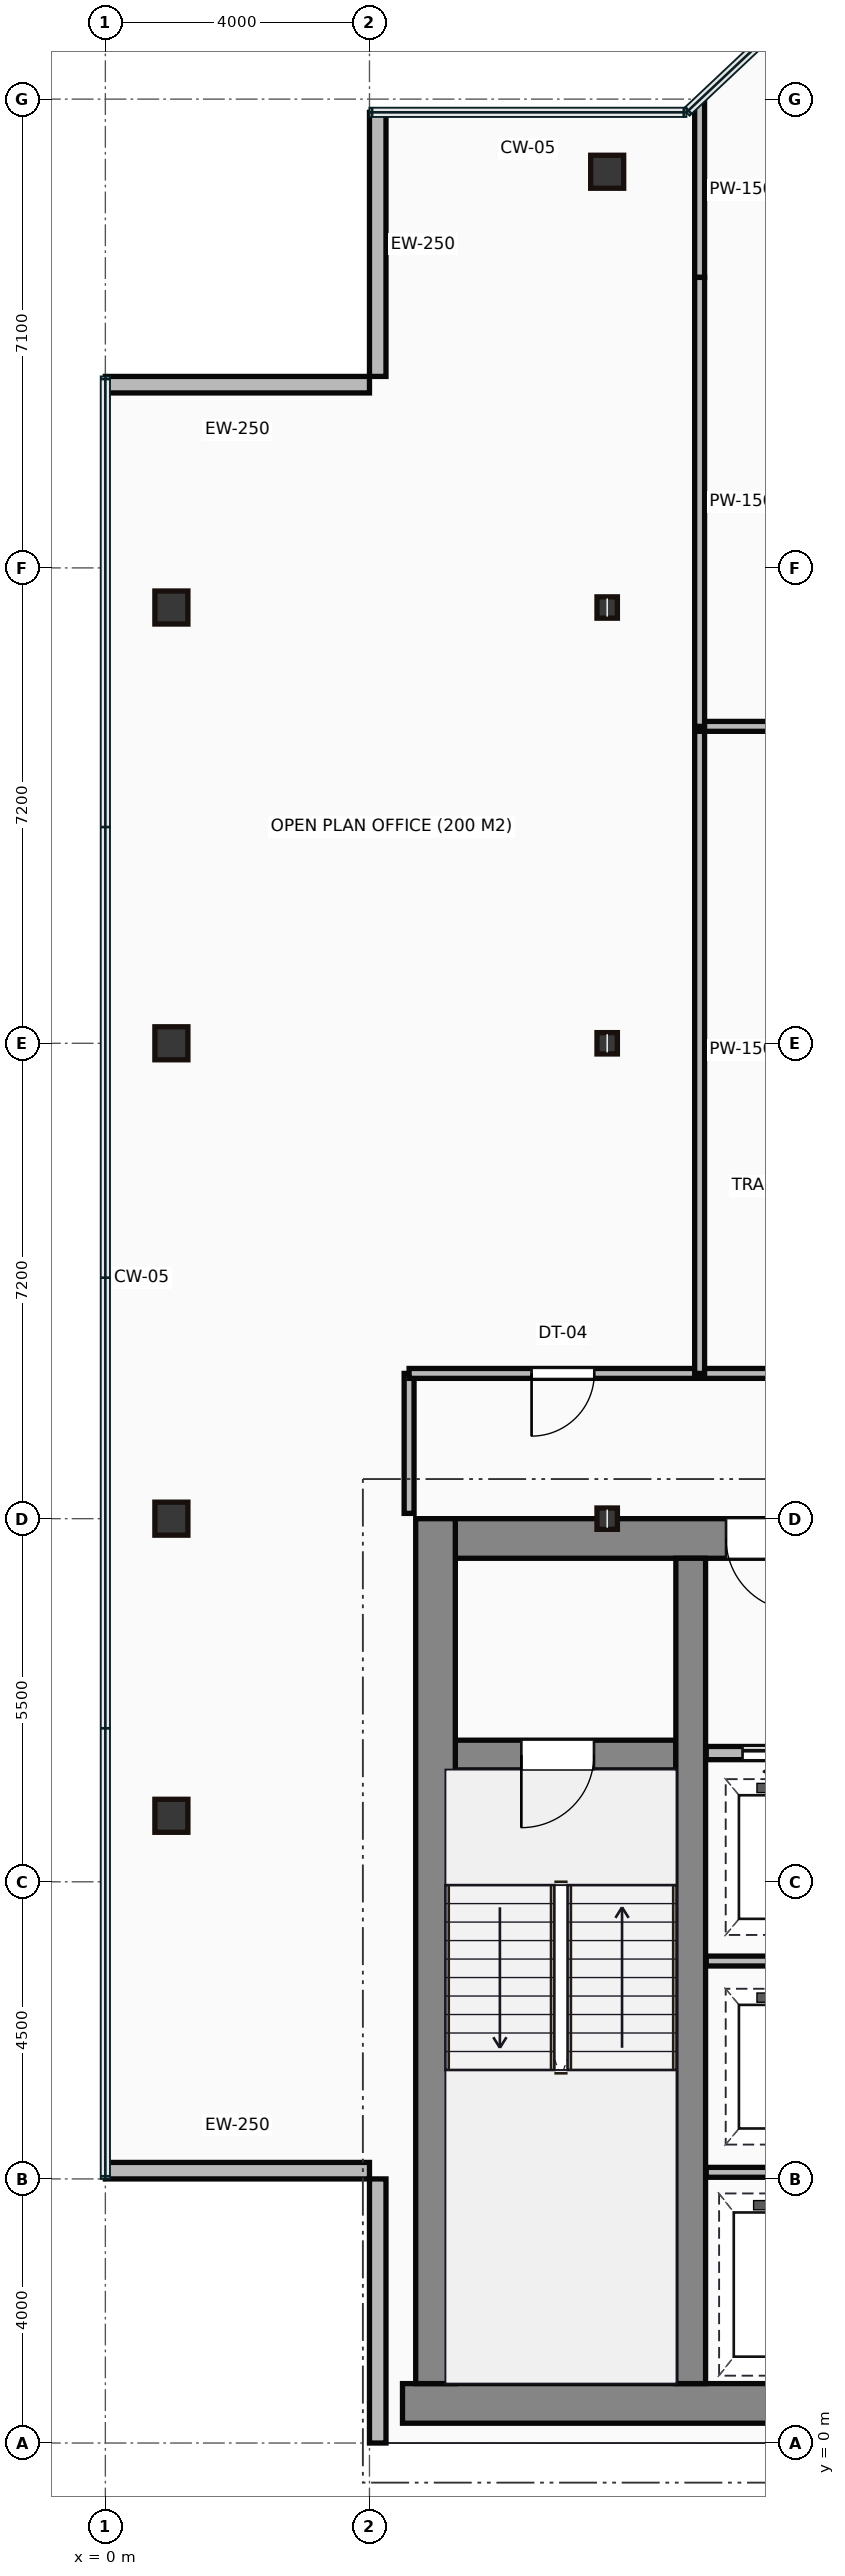
"""IFC4 building model, lengths in metres.
Left out: names, types, materials, properties, quantities, classifications, styles, units other than length and angle.
Written with IfcOpenShell. Run it as: python <this file> out.ifc"""

import sys

from ifc_helpers import new_model, si_unit, direction, frame, frame_2d, origin, origin_2d, place, context, subcontext, project, spatial, rectangle, hollow_rectangle, i_section, extrude, source, transform, mapped, element, fill, save


model = new_model("IFC4")
c1 = context("Model", 3, precision=1e-05, world=origin(), true_north=direction((0.0, 1.0)))
c2 = subcontext(c1, "Body", "Model", "MODEL_VIEW")
j1 = project(units=[si_unit("LENGTHUNIT", "METRE"), si_unit("PLANEANGLEUNIT", "RADIAN")], contexts=[c1])
p1 = place(None, origin())
s1 = spatial("IfcSite", under=j1, at=p1, CompositionType="ELEMENT")
p2 = place(p1, origin())
s2 = spatial("IfcBuilding", under=s1, at=p2, CompositionType="ELEMENT")
p3 = place(p2, frame((0.0, 0.0, 280.7)))
s3 = spatial("IfcBuildingStorey", under=s2, at=p3, CompositionType="ELEMENT", Elevation=280.7)
m1 = source(origin(), c2, "Body", "SweptSolid", [
    extrude(rectangle(XDim=29.5, YDim=0.6, at=frame_2d((14.75, 0.0))), origin(), (0.0, 0.0, 1.0), 3.65),
])
p4 = place(p3, frame((4.5, 0.6, 0.0), z_axis=(0.0, 0.0, 1.0), x_axis=(1.0, 0.0, 0.0)))
e1 = element("IfcWall", 1, at=p4, inside=s3, PredefinedType="SHEAR", context=c2, shape_type="MappedRepresentation", body=[
    mapped(m1, transform((0.0, 0.0, 0.0))),
])
m2 = source(origin(), c2, "Body", "SweptSolid", [
    extrude(rectangle(XDim=13.1, YDim=0.6, at=frame_2d((6.55, 0.0))), origin(), (0.0, 0.0, 1.0), 3.65),
])
p5 = place(p3, frame((5.0, 0.9, 0.0), z_axis=(0.0, 0.0, 1.0), x_axis=(0.0, 1.0, 0.0)))
e2 = element("IfcWall", 2, at=p5, inside=s3, PredefinedType="SHEAR", context=c2, shape_type="MappedRepresentation", body=[
    mapped(m2, transform((0.0, 0.0, 0.0))),
])
m3 = source(origin(), c2, "Body", "SweptSolid", [
    extrude(rectangle(XDim=9.1, YDim=0.6, at=frame_2d((4.55, 0.0))), origin(), (0.0, 0.0, 1.0), 3.65),
])
p6 = place(p3, frame((5.3, 13.7, 0.0), z_axis=(0.0, 0.0, 1.0), x_axis=(1.0, 0.0, 0.0)))
e3 = element("IfcWall", 3, at=p6, inside=s3, PredefinedType="SHEAR", context=c2, shape_type="MappedRepresentation", body=[
    mapped(m3, transform((0.0, 0.0, 0.0))),
])
p7 = place(p6, frame((4.1, 0.0, 0.0)))
e4 = element("IfcOpeningElement", 4, at=p7, cuts=e3, PredefinedType="OPENING", context=c2, shape_type="SweptSolid", body=[
    extrude(rectangle(XDim=1.1, YDim=2.15, at=frame_2d((0.55, 1.075))), frame((0.0, 0.31, 0.0), z_axis=(0.0, -1.0, 0.0), x_axis=(1.0, 0.0, 0.0)), (0.0, 0.0, 1.0), 0.62),
])
m4 = source(origin(), c2, "Body", "SweptSolid", [
    extrude(rectangle(XDim=12.5, YDim=0.45, at=frame_2d((6.25, 0.0))), origin(), (0.0, 0.0, 1.0), 3.65),
])
p8 = place(p3, frame((8.865, 0.9, 0.0), z_axis=(0.0, 0.0, 1.0), x_axis=(0.0, 1.0, 0.0)))
e5 = element("IfcWall", 5, at=p8, inside=s3, PredefinedType="SHEAR", context=c2, shape_type="MappedRepresentation", body=[
    mapped(m4, transform((0.0, 0.0, 0.0))),
])
m5 = source(origin(), c2, "Body", "SweptSolid", [
    extrude(rectangle(XDim=3.39, YDim=0.45, at=frame_2d((1.695, 0.0))), origin(), (0.0, 0.0, 1.0), 3.65),
])
p9 = place(p3, frame((5.25, 10.42, 0.0), z_axis=(0.0, 0.0, 1.0), x_axis=(1.0, 0.0, 0.0)))
e6 = element("IfcWall", 6, at=p9, inside=s3, PredefinedType="SHEAR", context=c2, shape_type="MappedRepresentation", body=[
    mapped(m5, transform((0.0, 0.0, 0.0))),
])
p10 = place(p9, frame((1.05, 0.0, 0.0)))
e7 = element("IfcOpeningElement", 7, at=p10, cuts=e6, PredefinedType="OPENING", context=c2, shape_type="SweptSolid", body=[
    extrude(rectangle(XDim=1.1, YDim=2.15, at=frame_2d((0.55, 1.075))), frame((0.0, 0.235, 0.0), z_axis=(0.0, -1.0, 0.0), x_axis=(1.0, 0.0, 0.0)), (0.0, 0.0, 1.0), 0.47),
])
m6 = source(origin(), c2, "Body", "SweptSolid", [
    extrude(hollow_rectangle(XDim=0.5, YDim=0.5, WallThickness=0.022, at=origin_2d()), origin(), (0.0, 0.0, 1.0), 3.65),
])
for number, where, z_axis, x_axis in (
    (8, (1.0, 9.5, 0.0), (0.0, 0.0, 1.0), (1.0, 0.0, 0.0)),
    (9, (1.0, 14.0, 0.0), (0.0, 0.0, 1.0), (1.0, 0.0, 0.0)),
    (10, (1.0, 21.2, 0.0), (0.0, 0.0, 1.0), (1.0, 0.0, 0.0)),
    (11, (1.0, 27.8, 0.0), (0.0, 0.0, 1.0), (1.0, 0.0, 0.0)),
):
    element("IfcColumn", number, at=place(p3, frame(where, z_axis=z_axis, x_axis=x_axis)), inside=s3, PredefinedType="COLUMN", context=c2, shape_type="MappedRepresentation", body=[
        mapped(m6, transform((0.0, 0.0, 0.0))),
    ])
m7 = source(origin(), c2, "Body", "SweptSolid", [
    extrude(i_section(OverallWidth=0.309, OverallDepth=0.323, WebThickness=0.014, FlangeThickness=0.023, at=origin_2d()), origin(), (0.0, 0.0, 1.0), 3.65),
])
for number, where, z_axis, x_axis in (
    (12, (7.6, 14.0, 0.0), (0.0, 0.0, 1.0), (1.0, 0.0, 0.0)),
    (13, (7.6, 21.2, 0.0), (0.0, 0.0, 1.0), (1.0, 0.0, 0.0)),
    (14, (7.6, 27.8, 0.0), (0.0, 0.0, 1.0), (1.0, 0.0, 0.0)),
):
    element("IfcColumn", number, at=place(p3, frame(where, z_axis=z_axis, x_axis=x_axis)), inside=s3, PredefinedType="COLUMN", context=c2, shape_type="MappedRepresentation", body=[
        mapped(m7, transform((0.0, 0.0, 0.0))),
    ])
p11 = place(p3, frame((7.6, 34.4, 0.0), z_axis=(0.0, 0.0, 1.0), x_axis=(1.0, 0.0, 0.0)))
e15 = element("IfcColumn", 15, at=p11, inside=s3, PredefinedType="COLUMN", context=c2, shape_type="MappedRepresentation", body=[
    mapped(m6, transform((0.0, 0.0, 0.0))),
])
m8 = source(origin(), c2, "Body", "SweptSolid", [
    extrude(rectangle(XDim=4.0, YDim=0.25, at=frame_2d((2.0, 0.0))), origin(), (0.0, 0.0, 1.0), 3.4),
])
for number, where, z_axis, x_axis in (
    (16, (4.125, 35.3, 0.0), (0.0, 0.0, 1.0), (0.0, -1.0, 0.0)),
    (17, (4.0, 31.175, 0.0), (0.0, 0.0, 1.0), (-1.0, 0.0, 0.0)),
    (18, (0.0, 4.125, 0.0), (0.0, 0.0, 1.0), (1.0, 0.0, 0.0)),
    (19, (4.125, 4.0, 0.0), (0.0, 0.0, 1.0), (0.0, -1.0, 0.0)),
):
    element("IfcWall", number, at=place(p3, frame(where, z_axis=z_axis, x_axis=x_axis)), inside=s3, PredefinedType="STANDARD", context=c2, shape_type="MappedRepresentation", body=[
        mapped(m8, transform((0.0, 0.0, 0.0))),
    ])
m9 = source(origin(), c2, "Body", "SweptSolid", [
    extrude(rectangle(XDim=2.35, YDim=0.2, at=frame_2d((1.175, 0.0))), origin(), (0.0, 0.0, 1.0), 3.4),
])
p12 = place(p3, frame((9.1, 10.45, 0.0), z_axis=(0.0, 0.0, 1.0), x_axis=(1.0, 0.0, 0.0)))
e20 = element("IfcWall", 20, at=p12, inside=s3, PredefinedType="PARTITIONING", context=c2, shape_type="MappedRepresentation", body=[
    mapped(m9, transform((0.0, 0.0, 0.0))),
])
p13 = place(p12, frame((0.55, 0.0, 0.0)))
e21 = element("IfcOpeningElement", 21, at=p13, cuts=e20, PredefinedType="OPENING", context=c2, shape_type="SweptSolid", body=[
    extrude(rectangle(XDim=1.1, YDim=2.15, at=frame_2d((0.55, 1.075))), frame((0.0, 0.11, 0.0), z_axis=(0.0, -1.0, 0.0), x_axis=(1.0, 0.0, 0.0)), (0.0, 0.0, 1.0), 0.22),
])
m10 = source(origin(), c2, "Body", "SweptSolid", [
    extrude(rectangle(XDim=2.4, YDim=0.15, at=frame_2d((1.2, 0.0))), origin(), (0.0, 0.0, 1.0), 3.4),
])
for number, where, z_axis, x_axis in (
    (22, (9.1, 4.1, 0.0), (0.0, 0.0, 1.0), (1.0, 0.0, 0.0)),
    (23, (9.1, 7.3, 0.0), (0.0, 0.0, 1.0), (1.0, 0.0, 0.0)),
):
    element("IfcWall", number, at=place(p3, frame(where, z_axis=z_axis, x_axis=x_axis)), inside=s3, PredefinedType="PARTITIONING", context=c2, shape_type="MappedRepresentation", body=[
        mapped(m10, transform((0.0, 0.0, 0.0))),
    ])
m11 = source(origin(), c2, "Body", "SweptSolid", [
    extrude(rectangle(XDim=2.12, YDim=0.15, at=frame_2d((1.06, 0.0))), origin(), (0.0, 0.0, 1.0), 3.4),
])
p14 = place(p3, frame((4.6, 14.08, 0.0), z_axis=(0.0, 0.0, 1.0), x_axis=(0.0, 1.0, 0.0)))
e24 = element("IfcWall", 24, at=p14, inside=s3, PredefinedType="PARTITIONING", context=c2, shape_type="MappedRepresentation", body=[
    mapped(m11, transform((0.0, 0.0, 0.0))),
])
m12 = source(origin(), c2, "Body", "SweptSolid", [
    extrude(rectangle(XDim=12.2, YDim=0.15, at=frame_2d((6.1, 0.0))), origin(), (0.0, 0.0, 1.0), 3.4),
])
p15 = place(p3, frame((4.6, 16.2, 0.0), z_axis=(0.0, 0.0, 1.0), x_axis=(1.0, 0.0, 0.0)))
e25 = element("IfcWall", 25, at=p15, inside=s3, PredefinedType="PARTITIONING", context=c2, shape_type="MappedRepresentation", body=[
    mapped(m12, transform((0.0, 0.0, 0.0))),
])
p16 = place(p15, frame((1.855, 0.0, 0.0)))
e26 = element("IfcOpeningElement", 26, at=p16, cuts=e25, PredefinedType="OPENING", context=c2, shape_type="SweptSolid", body=[
    extrude(rectangle(XDim=0.95, YDim=2.15, at=frame_2d((0.475, 1.075))), frame((0.0, 0.085, 0.0), z_axis=(0.0, -1.0, 0.0), x_axis=(1.0, 0.0, 0.0)), (0.0, 0.0, 1.0), 0.17),
])
m13 = source(origin(), c2, "Body", "SweptSolid", [
    extrude(rectangle(XDim=9.8, YDim=0.15, at=frame_2d((4.9, 0.0))), origin(), (0.0, 0.0, 1.0), 3.4),
])
p17 = place(p3, frame((9.0, 26.0, 0.0), z_axis=(0.0, 0.0, 1.0), x_axis=(0.0, -1.0, 0.0)))
e27 = element("IfcWall", 27, at=p17, inside=s3, PredefinedType="PARTITIONING", context=c2, shape_type="MappedRepresentation", body=[
    mapped(m13, transform((0.0, 0.0, 0.0))),
])
m14 = source(origin(), c2, "Body", "SweptSolid", [
    extrude(rectangle(XDim=7.8, YDim=0.15, at=frame_2d((3.9, 0.0))), origin(), (0.0, 0.0, 1.0), 3.4),
])
p18 = place(p3, frame((9.0, 26.0, 0.0), z_axis=(0.0, 0.0, 1.0), x_axis=(1.0, 0.0, 0.0)))
e28 = element("IfcWall", 28, at=p18, inside=s3, PredefinedType="PARTITIONING", context=c2, shape_type="MappedRepresentation", body=[
    mapped(m14, transform((0.0, 0.0, 0.0))),
])
m15 = source(origin(), c2, "Body", "SweptSolid", [
    extrude(rectangle(XDim=2.661, YDim=0.15, at=frame_2d((1.33, 0.0))), origin(), (0.0, 0.0, 1.0), 3.4),
])
p19 = place(p3, frame((9.0, 35.461, 0.0), z_axis=(0.0, 0.0, 1.0), x_axis=(0.0, -1.0, 0.0)))
e29 = element("IfcWall", 29, at=p19, inside=s3, PredefinedType="PARTITIONING", context=c2, shape_type="MappedRepresentation", body=[
    mapped(m15, transform((0.0, 0.0, 0.0))),
])
m16 = source(origin(), c2, "Body", "SweptSolid", [
    extrude(rectangle(XDim=6.8, YDim=0.15, at=frame_2d((3.4, 0.0))), origin(), (0.0, 0.0, 1.0), 3.4),
])
p20 = place(p3, frame((9.0, 32.8, 0.0), z_axis=(0.0, 0.0, 1.0), x_axis=(0.0, -1.0, 0.0)))
e30 = element("IfcWall", 30, at=p20, inside=s3, PredefinedType="PARTITIONING", context=c2, shape_type="MappedRepresentation", body=[
    mapped(m16, transform((0.0, 0.0, 0.0))),
])
m17 = source(origin(), c2, "Body", "SweptSolid", [
    extrude(rectangle(XDim=1.1, YDim=2.15, at=frame_2d((0.55, 1.075))), frame((0.0, 0.025, 0.0), z_axis=(0.0, -1.0, 0.0), x_axis=(1.0, 0.0, 0.0)), (0.0, 0.0, 1.0), 0.05),
])
p21 = place(p10, frame((1.1, 0.0, 0.0), z_axis=(0.0, 0.0, 1.0), x_axis=(-1.0, 0.0, 0.0)))
e31 = element("IfcDoor", 31, at=p21, inside=s3, OperationType="SINGLE_SWING_LEFT", PredefinedType="DOOR", context=c2, shape_type="MappedRepresentation", body=[
    mapped(m17, transform((0.0, 0.0, 0.0))),
])
fill(e7, e31)
p22 = place(p7, origin())
e32 = element("IfcDoor", 32, at=p22, inside=s3, OperationType="SINGLE_SWING_RIGHT", PredefinedType="DOOR", context=c2, shape_type="MappedRepresentation", body=[
    mapped(m17, transform((0.0, 0.0, 0.0))),
])
fill(e4, e32)
p23 = place(p13, origin())
e33 = element("IfcDoor", 33, at=p23, inside=s3, OperationType="SLIDING_TO_LEFT", PredefinedType="DOOR", context=c2, shape_type="MappedRepresentation", body=[
    mapped(m17, transform((0.0, 0.0, 0.0))),
])
fill(e21, e33)
m18 = source(origin(), c2, "Body", "SweptSolid", [
    extrude(rectangle(XDim=0.95, YDim=2.15, at=frame_2d((0.475, 1.075))), frame((0.0, 0.025, 0.0), z_axis=(0.0, -1.0, 0.0), x_axis=(1.0, 0.0, 0.0)), (0.0, 0.0, 1.0), 0.05),
])
p24 = place(p16, origin())
e34 = element("IfcDoor", 34, at=p24, inside=s3, OperationType="SINGLE_SWING_LEFT", PredefinedType="DOOR", context=c2, shape_type="MappedRepresentation", body=[
    mapped(m18, transform((0.0, 0.0, 0.0))),
])
fill(e26, e34)
save(model, sys.argv[1])
